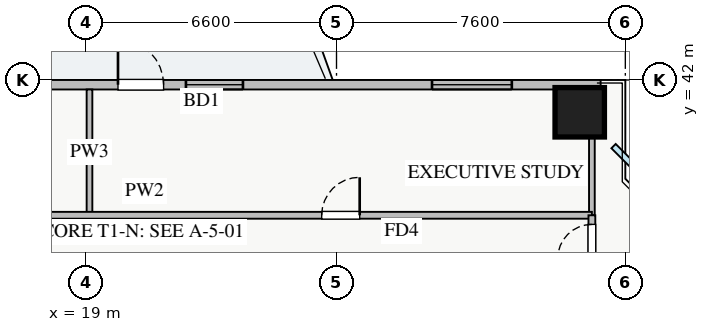
"""IFC4 building model, lengths in metres.
Left out: names, types, materials, properties, quantities, classifications, styles, units other than length and angle.
Written with IfcOpenShell. Run it as: python <this file> out.ifc"""

import sys

from ifc_helpers import new_model, si_unit, direction, frame, frame_2d, origin, origin_2d, place, context, subcontext, project, spatial, rectangle, extrude, source, transform, mapped, element, fill, save


model = new_model("IFC4")
c1 = context("Model", 3, precision=1e-05, world=origin(), true_north=direction((0.0, 1.0)))
c2 = subcontext(c1, "Body", "Model", "MODEL_VIEW")
j1 = project(units=[si_unit("LENGTHUNIT", "METRE"), si_unit("PLANEANGLEUNIT", "RADIAN")], contexts=[c1])
p1 = place(None, origin())
s1 = spatial("IfcSite", under=j1, at=p1, CompositionType="ELEMENT")
p2 = place(p1, origin())
s2 = spatial("IfcBuilding", under=s1, at=p2, CompositionType="ELEMENT")
p3 = place(p2, frame((0.0, 0.0, 26.25)))
s3 = spatial("IfcBuildingStorey", under=s2, at=p3, CompositionType="ELEMENT", Elevation=26.25)
m1 = source(origin(), c2, "Body", "SweptSolid", [
    extrude(rectangle(XDim=1.3, YDim=1.3, at=origin_2d()), origin(), (0.0, 0.0, 1.0), 3.25),
])
p4 = place(p3, frame((32.0, 41.15, 0.0), z_axis=(0.0, 0.0, 1.0), x_axis=(1.0, 0.0, 0.0)))
e1 = element("IfcColumn", 1, at=p4, inside=s3, PredefinedType="COLUMN", context=c2, shape_type="MappedRepresentation", body=[
    mapped(m1, transform((0.0, 0.0, 0.0), x_axis=(1.0, 0.0, 0.0), y_axis=(0.0, 1.0, 0.0), z_axis=(0.0, 0.0, 1.0), scale=1.0)),
])
p5 = place(p3, frame((5.45, 41.875, 0.0), z_axis=(0.0, 0.0, 1.0), x_axis=(1.0, 0.0, 0.0)))
e2 = element("IfcWall", 2, at=p5, inside=s3, PredefinedType="STANDARD", context=c2, shape_type="SweptSolid", body=[
    extrude(rectangle(XDim=27.1, YDim=0.25, at=frame_2d((13.55, 0.0))), origin(), (0.0, 0.0, 1.0), 2.61),
])
p6 = place(p5, frame((14.4, 0.0, 0.0)))
e3 = element("IfcOpeningElement", 3, at=p6, cuts=e2, PredefinedType="OPENING", context=c2, shape_type="SweptSolid", body=[
    extrude(rectangle(XDim=1.2, YDim=2.1, at=frame_2d((0.6, 1.05))), frame((0.0, 0.135, 0.0), z_axis=(0.0, -1.0, 0.0), x_axis=(1.0, 0.0, 0.0)), (0.0, 0.0, 1.0), 0.27),
])
p7 = place(p5, frame((1.48, 0.0, 0.9)))
e4 = element("IfcOpeningElement", 4, at=p7, cuts=e2, PredefinedType="OPENING", context=c2, shape_type="SweptSolid", body=[
    extrude(rectangle(XDim=1.5, YDim=1.5, at=frame_2d((0.75, 0.75))), frame((0.0, 0.135, 0.0), z_axis=(0.0, -1.0, 0.0), x_axis=(1.0, 0.0, 0.0)), (0.0, 0.0, 1.0), 0.27),
])
p8 = place(p5, frame((9.263, 0.0, 0.9)))
e5 = element("IfcOpeningElement", 5, at=p8, cuts=e2, PredefinedType="OPENING", context=c2, shape_type="SweptSolid", body=[
    extrude(rectangle(XDim=1.8, YDim=1.45, at=frame_2d((0.9, 0.725))), frame((0.0, 0.135, 0.0), z_axis=(0.0, -1.0, 0.0), x_axis=(1.0, 0.0, 0.0)), (0.0, 0.0, 1.0), 0.27),
])
p9 = place(p5, frame((16.188, 0.0, 0.9)))
e6 = element("IfcOpeningElement", 6, at=p9, cuts=e2, PredefinedType="OPENING", context=c2, shape_type="SweptSolid", body=[
    extrude(rectangle(XDim=1.5, YDim=1.45, at=frame_2d((0.75, 0.725))), frame((0.0, 0.135, 0.0), z_axis=(0.0, -1.0, 0.0), x_axis=(1.0, 0.0, 0.0)), (0.0, 0.0, 1.0), 0.27),
])
p10 = place(p5, frame((22.663, 0.0, 0.9)))
e7 = element("IfcOpeningElement", 7, at=p10, cuts=e2, PredefinedType="OPENING", context=c2, shape_type="SweptSolid", body=[
    extrude(rectangle(XDim=2.1, YDim=1.48, at=frame_2d((1.05, 0.74))), frame((0.0, 0.135, 0.0), z_axis=(0.0, -1.0, 0.0), x_axis=(1.0, 0.0, 0.0)), (0.0, 0.0, 1.0), 0.27),
])
p11 = place(p5, frame((5.114, 0.0, 0.9)))
e8 = element("IfcOpeningElement", 8, at=p11, cuts=e2, PredefinedType="OPENING", context=c2, shape_type="SweptSolid", body=[
    extrude(rectangle(XDim=2.4, YDim=1.5, at=frame_2d((1.2, 0.75))), frame((0.0, 0.135, 0.0), z_axis=(0.0, -1.0, 0.0), x_axis=(1.0, 0.0, 0.0)), (0.0, 0.0, 1.0), 0.27),
])
p12 = place(p3, frame((19.1, 38.44, 0.0), z_axis=(0.0, 0.0, 1.0), x_axis=(0.0, 1.0, 0.0)))
e9 = element("IfcWall", 9, at=p12, inside=s3, PredefinedType="PARTITIONING", context=c2, shape_type="SweptSolid", body=[
    extrude(rectangle(XDim=3.31, YDim=0.15, at=frame_2d((1.655, 0.0))), origin(), (0.0, 0.0, 1.0), 2.715),
])
p13 = place(p3, frame((32.32, 38.44, 0.0), z_axis=(0.0, 0.0, 1.0), x_axis=(0.0, 1.0, 0.0)))
e10 = element("IfcWall", 10, at=p13, inside=s3, PredefinedType="PARTITIONING", context=c2, shape_type="SweptSolid", body=[
    extrude(rectangle(XDim=3.31, YDim=0.15, at=frame_2d((1.655, 0.0))), origin(), (0.0, 0.0, 1.0), 3.07),
])
p14 = place(p3, frame((8.78, 38.44, 0.0), z_axis=(0.0, 0.0, 1.0), x_axis=(1.0, 0.0, 0.0)))
e11 = element("IfcWall", 11, at=p14, inside=s3, PredefinedType="PARTITIONING", context=c2, shape_type="SweptSolid", body=[
    extrude(rectangle(XDim=23.54, YDim=0.18, at=frame_2d((11.77, 0.0))), origin(), (0.0, 0.0, 1.0), 3.07),
])
p15 = place(p14, frame((4.66, 0.0, 0.0)))
e12 = element("IfcOpeningElement", 12, at=p15, cuts=e11, PredefinedType="OPENING", context=c2, shape_type="SweptSolid", body=[
    extrude(rectangle(XDim=1.0, YDim=2.05, at=frame_2d((0.5, 1.025))), frame((0.0, 0.1, 0.0), z_axis=(0.0, -1.0, 0.0), x_axis=(1.0, 0.0, 0.0)), (0.0, 0.0, 1.0), 0.2),
])
p16 = place(p14, frame((16.43, 0.0, 0.0)))
e13 = element("IfcOpeningElement", 13, at=p16, cuts=e11, PredefinedType="OPENING", context=c2, shape_type="SweptSolid", body=[
    extrude(rectangle(XDim=1.0, YDim=2.05, at=frame_2d((0.5, 1.025))), frame((0.0, 0.1, 0.0), z_axis=(0.0, -1.0, 0.0), x_axis=(1.0, 0.0, 0.0)), (0.0, 0.0, 1.0), 0.2),
])
p17 = place(p3, frame((32.32, 7.21, 0.0), z_axis=(0.0, 0.0, 1.0), x_axis=(0.0, 1.0, 0.0)))
e14 = element("IfcWall", 14, at=p17, inside=s3, PredefinedType="PARTITIONING", context=c2, shape_type="SweptSolid", body=[
    extrude(rectangle(XDim=31.23, YDim=0.18, at=frame_2d((15.615, 0.0))), origin(), (0.0, 0.0, 1.0), 2.715),
])
p18 = place(p17, frame((30.09, 0.0, 0.0)))
e15 = element("IfcOpeningElement", 15, at=p18, cuts=e14, PredefinedType="OPENING", context=c2, shape_type="SweptSolid", body=[
    extrude(rectangle(XDim=0.9, YDim=2.05, at=frame_2d((0.45, 1.025))), frame((0.0, 0.1, 0.0), z_axis=(0.0, -1.0, 0.0), x_axis=(1.0, 0.0, 0.0)), (0.0, 0.0, 1.0), 0.2),
])
p19 = place(p17, frame((0.415, 0.0, 0.0)))
e16 = element("IfcOpeningElement", 16, at=p19, cuts=e14, PredefinedType="OPENING", context=c2, shape_type="SweptSolid", body=[
    extrude(rectangle(XDim=0.9, YDim=2.05, at=frame_2d((0.45, 1.025))), frame((0.0, 0.1, 0.0), z_axis=(0.0, -1.0, 0.0), x_axis=(1.0, 0.0, 0.0)), (0.0, 0.0, 1.0), 0.2),
])
p20 = place(p17, frame((8.575, 0.0, 0.0)))
e17 = element("IfcOpeningElement", 17, at=p20, cuts=e14, PredefinedType="OPENING", context=c2, shape_type="SweptSolid", body=[
    extrude(rectangle(XDim=1.0, YDim=2.05, at=frame_2d((0.5, 1.025))), frame((0.0, 0.1, 0.0), z_axis=(0.0, -1.0, 0.0), x_axis=(1.0, 0.0, 0.0)), (0.0, 0.0, 1.0), 0.2),
])
p21 = place(p17, frame((19.375, 0.0, 0.0)))
e18 = element("IfcOpeningElement", 18, at=p21, cuts=e14, PredefinedType="OPENING", context=c2, shape_type="SweptSolid", body=[
    extrude(rectangle(XDim=1.0, YDim=2.05, at=frame_2d((0.5, 1.025))), frame((0.0, 0.1, 0.0), z_axis=(0.0, -1.0, 0.0), x_axis=(1.0, 0.0, 0.0)), (0.0, 0.0, 1.0), 0.2),
])
m2 = source(origin(), c2, "Body", "SweptSolid", [
    extrude(rectangle(XDim=1.2, YDim=2.1, at=frame_2d((0.6, 1.05))), frame((0.0, 0.025, 0.0), z_axis=(0.0, -1.0, 0.0), x_axis=(1.0, 0.0, 0.0)), (0.0, 0.0, 1.0), 0.05),
])
p22 = place(p6, origin())
e19 = element("IfcDoor", 19, at=p22, inside=s3, OperationType="SINGLE_SWING_LEFT", PredefinedType="DOOR", context=c2, shape_type="MappedRepresentation", body=[
    mapped(m2, transform((0.0, 0.0, 0.0), x_axis=(1.0, 0.0, 0.0), y_axis=(0.0, 1.0, 0.0), z_axis=(0.0, 0.0, 1.0), scale=1.0)),
])
fill(e3, e19)
m3 = source(origin(), c2, "Body", "SweptSolid", [
    extrude(rectangle(XDim=1.5, YDim=1.45, at=frame_2d((0.75, 0.725))), frame((0.0, 0.03, 0.0), z_axis=(0.0, -1.0, 0.0), x_axis=(1.0, 0.0, 0.0)), (0.0, 0.0, 1.0), 0.06),
])
p23 = place(p9, origin())
e20 = element("IfcWindow", 20, at=p23, inside=s3, PartitioningType="DOUBLE_PANEL_VERTICAL", PredefinedType="WINDOW", context=c2, shape_type="MappedRepresentation", body=[
    mapped(m3, transform((0.0, 0.0, 0.0), x_axis=(1.0, 0.0, 0.0), y_axis=(0.0, 1.0, 0.0), z_axis=(0.0, 0.0, 1.0), scale=1.0)),
])
fill(e6, e20)
m4 = source(origin(), c2, "Body", "SweptSolid", [
    extrude(rectangle(XDim=2.1, YDim=1.48, at=frame_2d((1.05, 0.74))), frame((0.0, 0.03, 0.0), z_axis=(0.0, -1.0, 0.0), x_axis=(1.0, 0.0, 0.0)), (0.0, 0.0, 1.0), 0.06),
])
p24 = place(p10, origin())
e21 = element("IfcWindow", 21, at=p24, inside=s3, PartitioningType="TRIPLE_PANEL_VERTICAL", PredefinedType="WINDOW", context=c2, shape_type="MappedRepresentation", body=[
    mapped(m4, transform((0.0, 0.0, 0.0), x_axis=(1.0, 0.0, 0.0), y_axis=(0.0, 1.0, 0.0), z_axis=(0.0, 0.0, 1.0), scale=1.0)),
])
fill(e7, e21)
m5 = source(origin(), c2, "Body", "SweptSolid", [
    extrude(rectangle(XDim=1.0, YDim=2.05, at=frame_2d((0.5, 1.025))), frame((0.0, 0.025, 0.0), z_axis=(0.0, -1.0, 0.0), x_axis=(1.0, 0.0, 0.0)), (0.0, 0.0, 1.0), 0.05),
])
p25 = place(p16, origin())
e22 = element("IfcDoor", 22, at=p25, inside=s3, OperationType="SINGLE_SWING_RIGHT", PredefinedType="DOOR", context=c2, shape_type="MappedRepresentation", body=[
    mapped(m5, transform((0.0, 0.0, 0.0), x_axis=(1.0, 0.0, 0.0), y_axis=(0.0, 1.0, 0.0), z_axis=(0.0, 0.0, 1.0), scale=1.0)),
])
fill(e13, e22)
m6 = source(origin(), c2, "Body", "SweptSolid", [
    extrude(rectangle(XDim=0.9, YDim=2.05, at=frame_2d((0.45, 1.025))), frame((0.0, 0.025, 0.0), z_axis=(0.0, -1.0, 0.0), x_axis=(1.0, 0.0, 0.0)), (0.0, 0.0, 1.0), 0.05),
])
p26 = place(p18, origin())
e23 = element("IfcDoor", 23, at=p26, inside=s3, OperationType="SINGLE_SWING_LEFT", PredefinedType="DOOR", context=c2, shape_type="MappedRepresentation", body=[
    mapped(m6, transform((0.0, 0.0, 0.0), x_axis=(1.0, 0.0, 0.0), y_axis=(0.0, 1.0, 0.0), z_axis=(0.0, 0.0, 1.0), scale=1.0)),
])
fill(e15, e23)
save(model, sys.argv[1])
